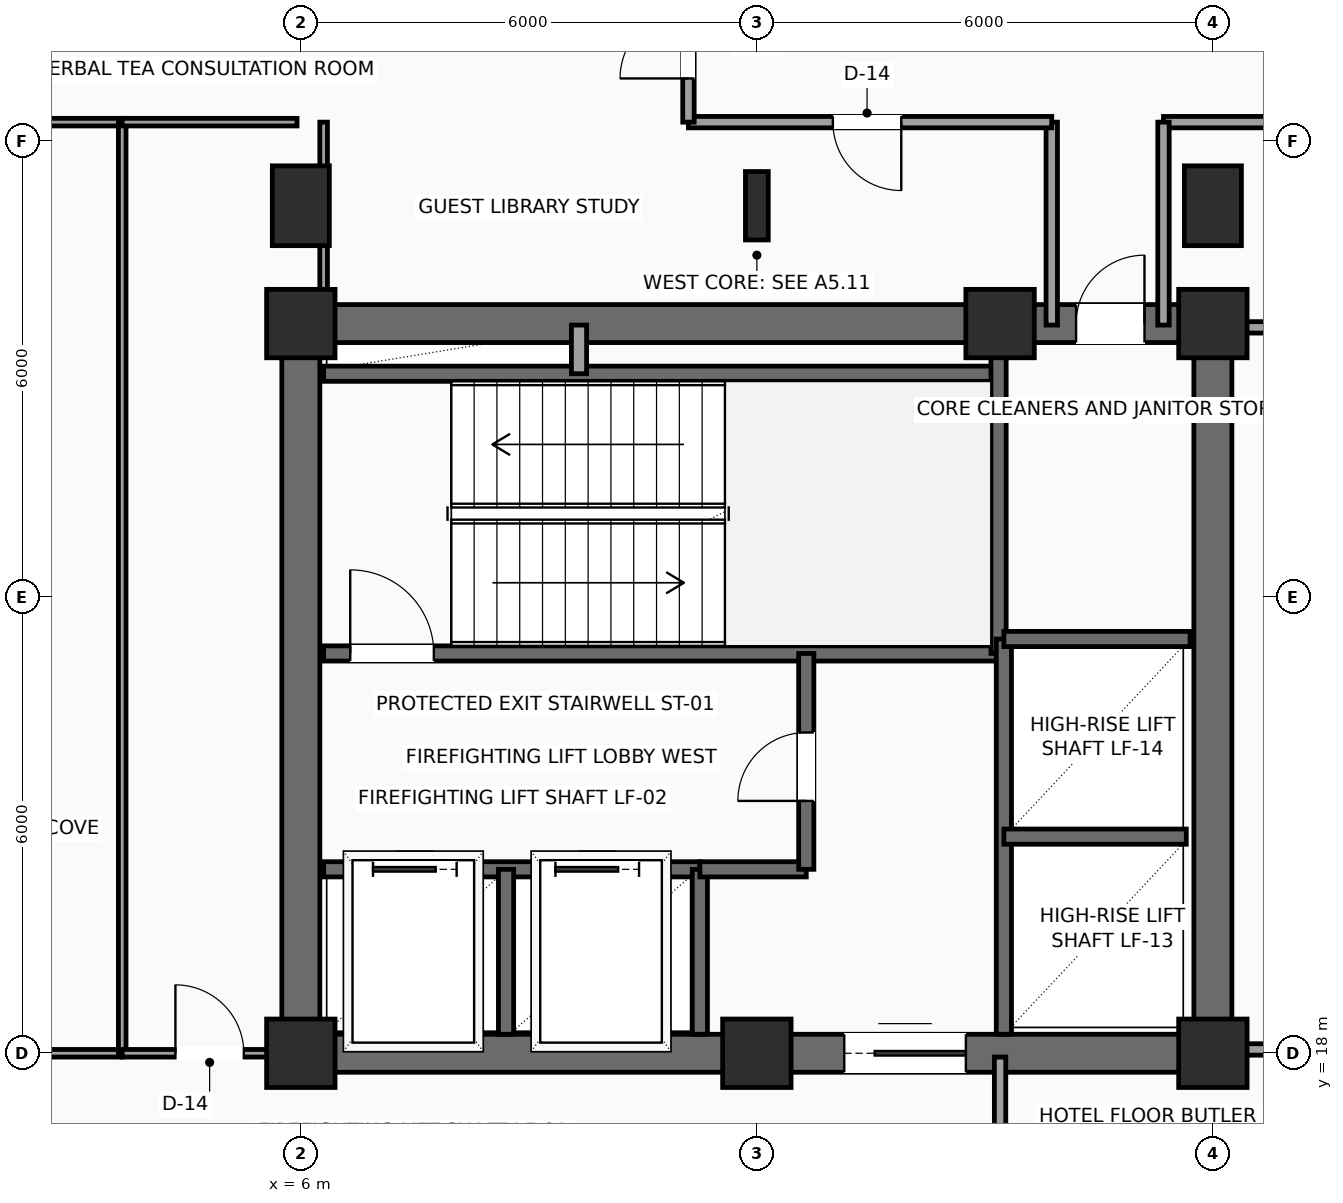
"""IFC4 building model, lengths in metres.
Left out: names, types, materials, properties, quantities, classifications, styles, units other than length and angle.
Written with IfcOpenShell. Run it as: python <this file> out.ifc"""

import sys

from ifc_helpers import new_model, si_unit, direction, frame, frame_2d, origin, origin_2d, place, context, subcontext, project, spatial, rectangle, i_section, extrude, element, fill, save


model = new_model("IFC4")
c1 = context("Model", 3, precision=1e-05, world=origin(), true_north=direction((0.0, 1.0)))
c2 = subcontext(c1, "Body", "Model", "MODEL_VIEW")
j1 = project(units=[si_unit("LENGTHUNIT", "METRE"), si_unit("PLANEANGLEUNIT", "RADIAN")], contexts=[c1])
p1 = place(None, origin())
s1 = spatial("IfcSite", under=j1, at=p1, CompositionType="ELEMENT")
p2 = place(p1, origin())
s2 = spatial("IfcBuilding", under=s1, at=p2, CompositionType="ELEMENT")
p3 = place(p2, frame((0.0, 0.0, 195.45)))
s3 = spatial("IfcBuildingStorey", under=s2, at=p3, CompositionType="ELEMENT", Elevation=195.45)
for number, where, z_axis, x_axis in (
    (1, (6.0, 18.0, 0.0), (0.0, 0.0, 1.0), (1.0, 0.0, 0.0)),
    (2, (12.0, 18.0, 0.0), (0.0, 0.0, 1.0), (1.0, 0.0, 0.0)),
    (3, (18.0, 18.0, 0.0), (0.0, 0.0, 1.0), (1.0, 0.0, 0.0)),
    (4, (6.0, 27.6, 0.0), (0.0, 0.0, 1.0), (1.0, 0.0, 0.0)),
    (5, (15.2, 27.6, 0.0), (0.0, 0.0, 1.0), (1.0, 0.0, 0.0)),
    (6, (18.0, 27.6, 0.0), (0.0, 0.0, 1.0), (1.0, 0.0, 0.0)),
):
    element("IfcColumn", number, at=place(p3, frame(where, z_axis=z_axis, x_axis=x_axis)), inside=s3, PredefinedType="COLUMN", context=c2, shape_type="SweptSolid", body=[
        extrude(rectangle(XDim=0.9, YDim=0.9, at=origin_2d()), origin(), (0.0, 0.0, 1.0), 3.75),
    ])
p4 = place(p3, frame((6.0, 29.15, 0.0), z_axis=(0.0, 0.0, 1.0), x_axis=(1.0, 0.0, 0.0)))
e7 = element("IfcColumn", 7, at=p4, inside=s3, PredefinedType="COLUMN", context=c2, shape_type="SweptSolid", body=[
    extrude(rectangle(XDim=0.75, YDim=1.05, at=origin_2d()), origin(), (0.0, 0.0, 1.0), 3.75),
])
p5 = place(p3, frame((12.0, 29.15, 0.0), z_axis=(0.0, 0.0, 1.0), x_axis=(1.0, 0.0, 0.0)))
e8 = element("IfcColumn", 8, at=p5, inside=s3, PredefinedType="COLUMN", context=c2, shape_type="SweptSolid", body=[
    extrude(i_section(OverallWidth=0.3, OverallDepth=0.9, WebThickness=0.019, FlangeThickness=0.035, FilletRadius=0.03, at=origin_2d()), origin(), (0.0, 0.0, 1.0), 3.75),
])
p6 = place(p3, frame((18.0, 29.15, 0.0), z_axis=(0.0, 0.0, 1.0), x_axis=(1.0, 0.0, 0.0)))
e9 = element("IfcColumn", 9, at=p6, inside=s3, PredefinedType="COLUMN", context=c2, shape_type="SweptSolid", body=[
    extrude(rectangle(XDim=0.75, YDim=1.05, at=origin_2d()), origin(), (0.0, 0.0, 1.0), 3.75),
])
p7 = place(p3, frame((6.0, 18.0, 0.0), z_axis=(0.0, 0.0, 1.0), x_axis=(1.0, 0.0, 0.0)))
e10 = element("IfcWall", 10, at=p7, inside=s3, PredefinedType="SHEAR", context=c2, shape_type="SweptSolid", body=[
    extrude(rectangle(XDim=12.0, YDim=0.5, at=frame_2d((6.0, 0.0))), origin(), (0.0, 0.0, 1.0), 3.475),
])
p8 = place(p7, frame((7.15, 0.0, 0.0)))
e11 = element("IfcOpeningElement", 11, at=p8, cuts=e10, PredefinedType="OPENING", context=c2, shape_type="SweptSolid", body=[
    extrude(rectangle(XDim=1.6, YDim=2.3, at=frame_2d((0.8, 1.15))), frame((0.0, 0.26, 0.0), z_axis=(0.0, -1.0, 0.0), x_axis=(1.0, 0.0, 0.0)), (0.0, 0.0, 1.0), 0.52),
])
p9 = place(p3, frame((6.0, 27.6, 0.0), z_axis=(0.0, 0.0, 1.0), x_axis=(1.0, 0.0, 0.0)))
e12 = element("IfcWall", 12, at=p9, inside=s3, PredefinedType="SHEAR", context=c2, shape_type="SweptSolid", body=[
    extrude(rectangle(XDim=12.0, YDim=0.5, at=frame_2d((6.0, 0.0))), origin(), (0.0, 0.0, 1.0), 3.475),
])
p10 = place(p9, frame((10.2, 0.0, 0.0)))
e13 = element("IfcOpeningElement", 13, at=p10, cuts=e12, PredefinedType="OPENING", context=c2, shape_type="SweptSolid", body=[
    extrude(rectangle(XDim=0.9, YDim=2.15, at=frame_2d((0.45, 1.075))), frame((0.0, 0.26, 0.0), z_axis=(0.0, -1.0, 0.0), x_axis=(1.0, 0.0, 0.0)), (0.0, 0.0, 1.0), 0.52),
])
for number, where, z_axis, x_axis in (
    (14, (6.0, 18.0, 0.0), (0.0, 0.0, 1.0), (0.0, 1.0, 0.0)),
    (15, (18.0, 18.0, 0.0), (0.0, 0.0, 1.0), (0.0, 1.0, 0.0)),
):
    element("IfcWall", number, at=place(p3, frame(where, z_axis=z_axis, x_axis=x_axis)), inside=s3, PredefinedType="SHEAR", context=c2, shape_type="SweptSolid", body=[
        extrude(rectangle(XDim=9.6, YDim=0.5, at=frame_2d((4.8, 0.0))), origin(), (0.0, 0.0, 1.0), 3.475),
    ])
p11 = place(p3, frame((6.3, 23.26, 0.0), z_axis=(0.0, 0.0, 1.0), x_axis=(1.0, 0.0, 0.0)))
e16 = element("IfcWall", 16, at=p11, inside=s3, PredefinedType="SHEAR", context=c2, shape_type="SweptSolid", body=[
    extrude(rectangle(XDim=8.88, YDim=0.2, at=frame_2d((4.44, 0.0))), origin(), (0.0, 0.0, 1.0), 3.475),
])
p12 = place(p11, frame((0.35, 0.0, 0.0)))
e17 = element("IfcOpeningElement", 17, at=p12, cuts=e16, PredefinedType="OPENING", context=c2, shape_type="SweptSolid", body=[
    extrude(rectangle(XDim=1.1, YDim=2.2, at=frame_2d((0.55, 1.1))), frame((0.0, 0.11, 0.0), z_axis=(0.0, -1.0, 0.0), x_axis=(1.0, 0.0, 0.0)), (0.0, 0.0, 1.0), 0.22),
])
p13 = place(p3, frame((6.3, 26.94, 0.0), z_axis=(0.0, 0.0, 1.0), x_axis=(1.0, 0.0, 0.0)))
e18 = element("IfcWall", 18, at=p13, inside=s3, PredefinedType="SHEAR", context=c2, shape_type="SweptSolid", body=[
    extrude(rectangle(XDim=8.88, YDim=0.2, at=frame_2d((4.44, 0.0))), origin(), (0.0, 0.0, 1.0), 3.475),
])
p14 = place(p3, frame((15.18, 23.26, 0.0), z_axis=(0.0, 0.0, 1.0), x_axis=(0.0, 1.0, 0.0)))
e19 = element("IfcWall", 19, at=p14, inside=s3, PredefinedType="SHEAR", context=c2, shape_type="SweptSolid", body=[
    extrude(rectangle(XDim=4.04, YDim=0.2, at=frame_2d((2.02, 0.0))), origin(), (0.0, 0.0, 1.0), 3.475),
])
p15 = place(p3, frame((6.3, 20.42, 0.0), z_axis=(0.0, 0.0, 1.0), x_axis=(1.0, 0.0, 0.0)))
e20 = element("IfcWall", 20, at=p15, inside=s3, PredefinedType="SHEAR", context=c2, shape_type="SweptSolid", body=[
    extrude(rectangle(XDim=4.95, YDim=0.2, at=frame_2d((2.475, 0.0))), origin(), (0.0, 0.0, 1.0), 3.475),
])
p16 = place(p15, frame((0.65, 0.0, 0.0)))
e21 = element("IfcOpeningElement", 21, at=p16, cuts=e20, PredefinedType="OPENING", context=c2, shape_type="SweptSolid", body=[
    extrude(rectangle(XDim=1.1, YDim=2.2, at=frame_2d((0.55, 1.1))), frame((0.0, 0.11, 0.0), z_axis=(0.0, -1.0, 0.0), x_axis=(1.0, 0.0, 0.0)), (0.0, 0.0, 1.0), 0.22),
])
p17 = place(p15, frame((3.05, 0.0, 0.0)))
e22 = element("IfcOpeningElement", 22, at=p17, cuts=e20, PredefinedType="OPENING", context=c2, shape_type="SweptSolid", body=[
    extrude(rectangle(XDim=1.1, YDim=2.2, at=frame_2d((0.55, 1.1))), frame((0.0, 0.11, 0.0), z_axis=(0.0, -1.0, 0.0), x_axis=(1.0, 0.0, 0.0)), (0.0, 0.0, 1.0), 0.22),
])
for number, where, z_axis, x_axis in (
    (23, (8.7, 18.25, 0.0), (0.0, 0.0, 1.0), (0.0, 1.0, 0.0)),
    (24, (11.25, 18.25, 0.0), (0.0, 0.0, 1.0), (0.0, 1.0, 0.0)),
):
    element("IfcWall", number, at=place(p3, frame(where, z_axis=z_axis, x_axis=x_axis)), inside=s3, PredefinedType="SHEAR", context=c2, shape_type="SweptSolid", body=[
        extrude(rectangle(XDim=2.17, YDim=0.2, at=frame_2d((1.085, 0.0))), origin(), (0.0, 0.0, 1.0), 3.475),
    ])
p18 = place(p3, frame((11.25, 20.42, 0.0), z_axis=(0.0, 0.0, 1.0), x_axis=(1.0, 0.0, 0.0)))
e25 = element("IfcWall", 25, at=p18, inside=s3, PredefinedType="SHEAR", context=c2, shape_type="SweptSolid", body=[
    extrude(rectangle(XDim=1.4, YDim=0.2, at=frame_2d((0.7, 0.0))), origin(), (0.0, 0.0, 1.0), 3.475),
])
p19 = place(p3, frame((12.65, 20.42, 0.0), z_axis=(0.0, 0.0, 1.0), x_axis=(0.0, 1.0, 0.0)))
e26 = element("IfcWall", 26, at=p19, inside=s3, PredefinedType="SHEAR", context=c2, shape_type="SweptSolid", body=[
    extrude(rectangle(XDim=2.84, YDim=0.2, at=frame_2d((1.42, 0.0))), origin(), (0.0, 0.0, 1.0), 3.475),
])
p20 = place(p19, frame((0.9, 0.0, 0.0)))
e27 = element("IfcOpeningElement", 27, at=p20, cuts=e26, PredefinedType="OPENING", context=c2, shape_type="SweptSolid", body=[
    extrude(rectangle(XDim=0.9, YDim=2.15, at=frame_2d((0.45, 1.075))), frame((0.0, 0.11, 0.0), z_axis=(0.0, -1.0, 0.0), x_axis=(1.0, 0.0, 0.0)), (0.0, 0.0, 1.0), 0.22),
])
p21 = place(p3, frame((9.66, 26.94, 0.0), z_axis=(0.0, 0.0, 1.0), x_axis=(0.0, 1.0, 0.0)))
e28 = element("IfcWall", 28, at=p21, inside=s3, PredefinedType="SOLIDWALL", context=c2, shape_type="SweptSolid", body=[
    extrude(rectangle(XDim=0.64, YDim=0.2, at=frame_2d((0.32, 0.0))), origin(), (0.0, 0.0, 1.0), 3.475),
])
p22 = place(p3, frame((15.25, 18.25, 0.0), z_axis=(0.0, 0.0, 1.0), x_axis=(0.0, 1.0, 0.0)))
e29 = element("IfcWall", 29, at=p22, inside=s3, PredefinedType="SHEAR", context=c2, shape_type="SweptSolid", body=[
    extrude(rectangle(XDim=5.2, YDim=0.2, at=frame_2d((2.6, 0.0))), origin(), (0.0, 0.0, 1.0), 3.475),
])
p23 = place(p3, frame((15.25, 20.85, 0.0), z_axis=(0.0, 0.0, 1.0), x_axis=(1.0, 0.0, 0.0)))
e30 = element("IfcWall", 30, at=p23, inside=s3, PredefinedType="SHEAR", context=c2, shape_type="SweptSolid", body=[
    extrude(rectangle(XDim=2.4, YDim=0.2, at=frame_2d((1.2, 0.0))), origin(), (0.0, 0.0, 1.0), 3.475),
])
p24 = place(p3, frame((15.25, 23.45, 0.0), z_axis=(0.0, 0.0, 1.0), x_axis=(1.0, 0.0, 0.0)))
e31 = element("IfcWall", 31, at=p24, inside=s3, PredefinedType="SHEAR", context=c2, shape_type="SweptSolid", body=[
    extrude(rectangle(XDim=2.45, YDim=0.2, at=frame_2d((1.225, 0.0))), origin(), (0.0, 0.0, 1.0), 3.475),
])
p25 = place(p3, frame((15.2, 17.95, 0.0), z_axis=(0.0, 0.0, 1.0), x_axis=(0.0, -1.0, 0.0)))
e32 = element("IfcWall", 32, at=p25, inside=s3, PredefinedType="PARTITIONING", context=c2, shape_type="SweptSolid", body=[
    extrude(rectangle(XDim=1.7, YDim=0.15, at=frame_2d((0.85, 0.0))), origin(), (0.0, 0.0, 1.0), 3.475),
])
p26 = place(p3, frame((21.95, 30.25, 0.0), z_axis=(0.0, 0.0, 1.0), x_axis=(-1.0, 0.0, 0.0)))
e33 = element("IfcWall", 33, at=p26, inside=s3, PredefinedType="PARTITIONING", context=c2, shape_type="SweptSolid", body=[
    extrude(rectangle(XDim=4.6, YDim=0.15, at=frame_2d((2.3, 0.0))), origin(), (0.0, 0.0, 1.0), 3.475),
])
p27 = place(p26, frame((1.85, 0.0, 0.0)))
e34 = element("IfcOpeningElement", 34, at=p27, cuts=e33, PredefinedType="OPENING", context=c2, shape_type="SweptSolid", body=[
    extrude(rectangle(XDim=0.9, YDim=2.1, at=frame_2d((0.45, 1.05))), frame((0.0, 0.085, 0.0), z_axis=(0.0, -1.0, 0.0), x_axis=(1.0, 0.0, 0.0)), (0.0, 0.0, 1.0), 0.17),
])
for number, where, z_axis, x_axis in (
    (35, (17.35, 30.25, 0.0), (0.0, 0.0, 1.0), (0.0, -1.0, 0.0)),
    (36, (15.88, 27.58, 0.0), (0.0, 0.0, 1.0), (0.0, 1.0, 0.0)),
):
    element("IfcWall", number, at=place(p3, frame(where, z_axis=z_axis, x_axis=x_axis)), inside=s3, PredefinedType="PARTITIONING", context=c2, shape_type="SweptSolid", body=[
        extrude(rectangle(XDim=2.67, YDim=0.15, at=frame_2d((1.335, 0.0))), origin(), (0.0, 0.0, 1.0), 3.475),
    ])
p28 = place(p3, frame((15.88, 30.25, 0.0), z_axis=(0.0, 0.0, 1.0), x_axis=(-1.0, 0.0, 0.0)))
e37 = element("IfcWall", 37, at=p28, inside=s3, PredefinedType="PARTITIONING", context=c2, shape_type="SweptSolid", body=[
    extrude(rectangle(XDim=4.78, YDim=0.15, at=frame_2d((2.39, 0.0))), origin(), (0.0, 0.0, 1.0), 3.475),
])
p29 = place(p28, frame((1.98, 0.0, 0.0)))
e38 = element("IfcOpeningElement", 38, at=p29, cuts=e37, PredefinedType="OPENING", context=c2, shape_type="SweptSolid", body=[
    extrude(rectangle(XDim=0.9, YDim=2.1, at=frame_2d((0.45, 1.05))), frame((0.0, 0.085, 0.0), z_axis=(0.0, -1.0, 0.0), x_axis=(1.0, 0.0, 0.0)), (0.0, 0.0, 1.0), 0.17),
])
p30 = place(p3, frame((11.1, 30.25, 0.0), z_axis=(0.0, 0.0, 1.0), x_axis=(0.0, 1.0, 0.0)))
e39 = element("IfcWall", 39, at=p30, inside=s3, PredefinedType="PARTITIONING", context=c2, shape_type="SweptSolid", body=[
    extrude(rectangle(XDim=2.05, YDim=0.15, at=frame_2d((1.025, 0.0))), origin(), (0.0, 0.0, 1.0), 3.475),
])
p31 = place(p30, frame((0.575, 0.0, 0.0)))
e40 = element("IfcOpeningElement", 40, at=p31, cuts=e39, PredefinedType="OPENING", context=c2, shape_type="SweptSolid", body=[
    extrude(rectangle(XDim=0.9, YDim=2.1, at=frame_2d((0.45, 1.05))), frame((0.0, 0.085, 0.0), z_axis=(0.0, -1.0, 0.0), x_axis=(1.0, 0.0, 0.0)), (0.0, 0.0, 1.0), 0.17),
])
p32 = place(p3, frame((18.1, 18.05, 0.0), z_axis=(0.0, 0.0, 1.0), x_axis=(1.0, 0.0, 0.0)))
e41 = element("IfcWall", 41, at=p32, inside=s3, PredefinedType="PARTITIONING", context=c2, shape_type="SweptSolid", body=[
    extrude(rectangle(XDim=3.25, YDim=0.15, at=frame_2d((1.625, 0.0))), origin(), (0.0, 0.0, 1.0), 3.067),
])
p33 = place(p3, frame((18.1, 27.55, 0.0), z_axis=(0.0, 0.0, 1.0), x_axis=(1.0, 0.0, 0.0)))
e42 = element("IfcWall", 42, at=p33, inside=s3, PredefinedType="PARTITIONING", context=c2, shape_type="SweptSolid", body=[
    extrude(rectangle(XDim=3.25, YDim=0.15, at=frame_2d((1.625, 0.0))), origin(), (0.0, 0.0, 1.0), 3.475),
])
p34 = place(p3, frame((0.3, 18.0, 0.0), z_axis=(0.0, 0.0, 1.0), x_axis=(1.0, 0.0, 0.0)))
e43 = element("IfcWall", 43, at=p34, inside=s3, PredefinedType="PARTITIONING", context=c2, shape_type="SweptSolid", body=[
    extrude(rectangle(XDim=3.35, YDim=0.1, at=frame_2d((1.675, 0.0))), origin(), (0.0, 0.0, 1.0), 3.067),
])
p35 = place(p34, frame((1.25, 0.0, 0.0)))
e44 = element("IfcOpeningElement", 44, at=p35, cuts=e43, PredefinedType="OPENING", context=c2, shape_type="SweptSolid", body=[
    extrude(rectangle(XDim=0.9, YDim=2.1, at=frame_2d((0.45, 1.05))), frame((0.0, 0.06, 0.0), z_axis=(0.0, -1.0, 0.0), x_axis=(1.0, 0.0, 0.0)), (0.0, 0.0, 1.0), 0.12),
])
p36 = place(p3, frame((0.3, 30.25, 0.0), z_axis=(0.0, 0.0, 1.0), x_axis=(1.0, 0.0, 0.0)))
e45 = element("IfcWall", 45, at=p36, inside=s3, PredefinedType="PARTITIONING", context=c2, shape_type="SweptSolid", body=[
    extrude(rectangle(XDim=3.35, YDim=0.1, at=frame_2d((1.675, 0.0))), origin(), (0.0, 0.0, 1.0), 3.475),
])
p37 = place(p3, frame((3.65, 18.0, 0.0), z_axis=(0.0, 0.0, 1.0), x_axis=(0.0, 1.0, 0.0)))
e46 = element("IfcWall", 46, at=p37, inside=s3, PredefinedType="PARTITIONING", context=c2, shape_type="SweptSolid", body=[
    extrude(rectangle(XDim=12.25, YDim=0.1, at=frame_2d((6.125, 0.0))), origin(), (0.0, 0.0, 1.0), 3.475),
])
p38 = place(p3, frame((3.65, 18.0, 0.0), z_axis=(0.0, 0.0, 1.0), x_axis=(1.0, 0.0, 0.0)))
e47 = element("IfcWall", 47, at=p38, inside=s3, PredefinedType="PARTITIONING", context=c2, shape_type="SweptSolid", body=[
    extrude(rectangle(XDim=2.3, YDim=0.1, at=frame_2d((1.15, 0.0))), origin(), (0.0, 0.0, 1.0), 3.067),
])
p39 = place(p38, frame((0.7, 0.0, 0.0)))
e48 = element("IfcOpeningElement", 48, at=p39, cuts=e47, PredefinedType="OPENING", context=c2, shape_type="SweptSolid", body=[
    extrude(rectangle(XDim=0.9, YDim=2.1, at=frame_2d((0.45, 1.05))), frame((0.0, 0.06, 0.0), z_axis=(0.0, -1.0, 0.0), x_axis=(1.0, 0.0, 0.0)), (0.0, 0.0, 1.0), 0.12),
])
p40 = place(p3, frame((3.65, 30.25, 0.0), z_axis=(0.0, 0.0, 1.0), x_axis=(1.0, 0.0, 0.0)))
e49 = element("IfcWall", 49, at=p40, inside=s3, PredefinedType="PARTITIONING", context=c2, shape_type="SweptSolid", body=[
    extrude(rectangle(XDim=2.3, YDim=0.1, at=frame_2d((1.15, 0.0))), origin(), (0.0, 0.0, 1.0), 3.475),
])
p41 = place(p3, frame((6.3, 27.65, 0.0), z_axis=(0.0, 0.0, 1.0), x_axis=(0.0, 1.0, 0.0)))
e50 = element("IfcWall", 50, at=p41, inside=s3, PredefinedType="PARTITIONING", context=c2, shape_type="SweptSolid", body=[
    extrude(rectangle(XDim=2.6, YDim=0.1, at=frame_2d((1.3, 0.0))), origin(), (0.0, 0.0, 1.0), 3.475),
])
p42 = place(p8, origin())
e51 = element("IfcDoor", 51, at=p42, inside=s3, OperationType="DOUBLE_DOOR_SLIDING", PredefinedType="DOOR", context=c2, shape_type="SweptSolid", body=[
    extrude(rectangle(XDim=1.6, YDim=2.3, at=frame_2d((0.8, 1.15))), frame((0.0, 0.025, 0.0), z_axis=(0.0, -1.0, 0.0), x_axis=(1.0, 0.0, 0.0)), (0.0, 0.0, 1.0), 0.05),
])
fill(e11, e51)
p43 = place(p10, origin())
e52 = element("IfcDoor", 52, at=p43, inside=s3, OperationType="SINGLE_SWING_RIGHT", PredefinedType="DOOR", context=c2, shape_type="SweptSolid", body=[
    extrude(rectangle(XDim=0.9, YDim=2.15, at=frame_2d((0.45, 1.075))), frame((0.0, 0.025, 0.0), z_axis=(0.0, -1.0, 0.0), x_axis=(1.0, 0.0, 0.0)), (0.0, 0.0, 1.0), 0.05),
])
fill(e13, e52)
p44 = place(p12, origin())
e53 = element("IfcDoor", 53, at=p44, inside=s3, OperationType="SINGLE_SWING_LEFT", PredefinedType="DOOR", context=c2, shape_type="SweptSolid", body=[
    extrude(rectangle(XDim=1.1, YDim=2.2, at=frame_2d((0.55, 1.1))), frame((0.0, 0.025, 0.0), z_axis=(0.0, -1.0, 0.0), x_axis=(1.0, 0.0, 0.0)), (0.0, 0.0, 1.0), 0.05),
])
fill(e17, e53)
p45 = place(p16, origin())
e54 = element("IfcDoor", 54, at=p45, inside=s3, OperationType="SLIDING_TO_LEFT", PredefinedType="DOOR", context=c2, shape_type="SweptSolid", body=[
    extrude(rectangle(XDim=1.1, YDim=2.2, at=frame_2d((0.55, 1.1))), frame((0.0, 0.025, 0.0), z_axis=(0.0, -1.0, 0.0), x_axis=(1.0, 0.0, 0.0)), (0.0, 0.0, 1.0), 0.05),
])
fill(e21, e54)
p46 = place(p17, origin())
e55 = element("IfcDoor", 55, at=p46, inside=s3, OperationType="SLIDING_TO_LEFT", PredefinedType="DOOR", context=c2, shape_type="SweptSolid", body=[
    extrude(rectangle(XDim=1.1, YDim=2.2, at=frame_2d((0.55, 1.1))), frame((0.0, 0.025, 0.0), z_axis=(0.0, -1.0, 0.0), x_axis=(1.0, 0.0, 0.0)), (0.0, 0.0, 1.0), 0.05),
])
fill(e22, e55)
p47 = place(p20, origin())
e56 = element("IfcDoor", 56, at=p47, inside=s3, OperationType="SINGLE_SWING_LEFT", PredefinedType="DOOR", context=c2, shape_type="SweptSolid", body=[
    extrude(rectangle(XDim=0.9, YDim=2.15, at=frame_2d((0.45, 1.075))), frame((0.0, 0.025, 0.0), z_axis=(0.0, -1.0, 0.0), x_axis=(1.0, 0.0, 0.0)), (0.0, 0.0, 1.0), 0.05),
])
fill(e27, e56)
p48 = place(p29, origin())
e57 = element("IfcDoor", 57, at=p48, inside=s3, OperationType="SINGLE_SWING_LEFT", PredefinedType="DOOR", context=c2, shape_type="SweptSolid", body=[
    extrude(rectangle(XDim=0.9, YDim=2.1, at=frame_2d((0.45, 1.05))), frame((0.0, 0.025, 0.0), z_axis=(0.0, -1.0, 0.0), x_axis=(1.0, 0.0, 0.0)), (0.0, 0.0, 1.0), 0.05),
])
fill(e38, e57)
p49 = place(p31, origin())
e58 = element("IfcDoor", 58, at=p49, inside=s3, OperationType="SINGLE_SWING_LEFT", PredefinedType="DOOR", context=c2, shape_type="SweptSolid", body=[
    extrude(rectangle(XDim=0.9, YDim=2.1, at=frame_2d((0.45, 1.05))), frame((0.0, 0.025, 0.0), z_axis=(0.0, -1.0, 0.0), x_axis=(1.0, 0.0, 0.0)), (0.0, 0.0, 1.0), 0.05),
])
fill(e40, e58)
p50 = place(p39, origin())
e59 = element("IfcDoor", 59, at=p50, inside=s3, OperationType="SINGLE_SWING_LEFT", PredefinedType="DOOR", context=c2, shape_type="SweptSolid", body=[
    extrude(rectangle(XDim=0.9, YDim=2.1, at=frame_2d((0.45, 1.05))), frame((0.0, 0.025, 0.0), z_axis=(0.0, -1.0, 0.0), x_axis=(1.0, 0.0, 0.0)), (0.0, 0.0, 1.0), 0.05),
])
fill(e48, e59)
save(model, sys.argv[1])
